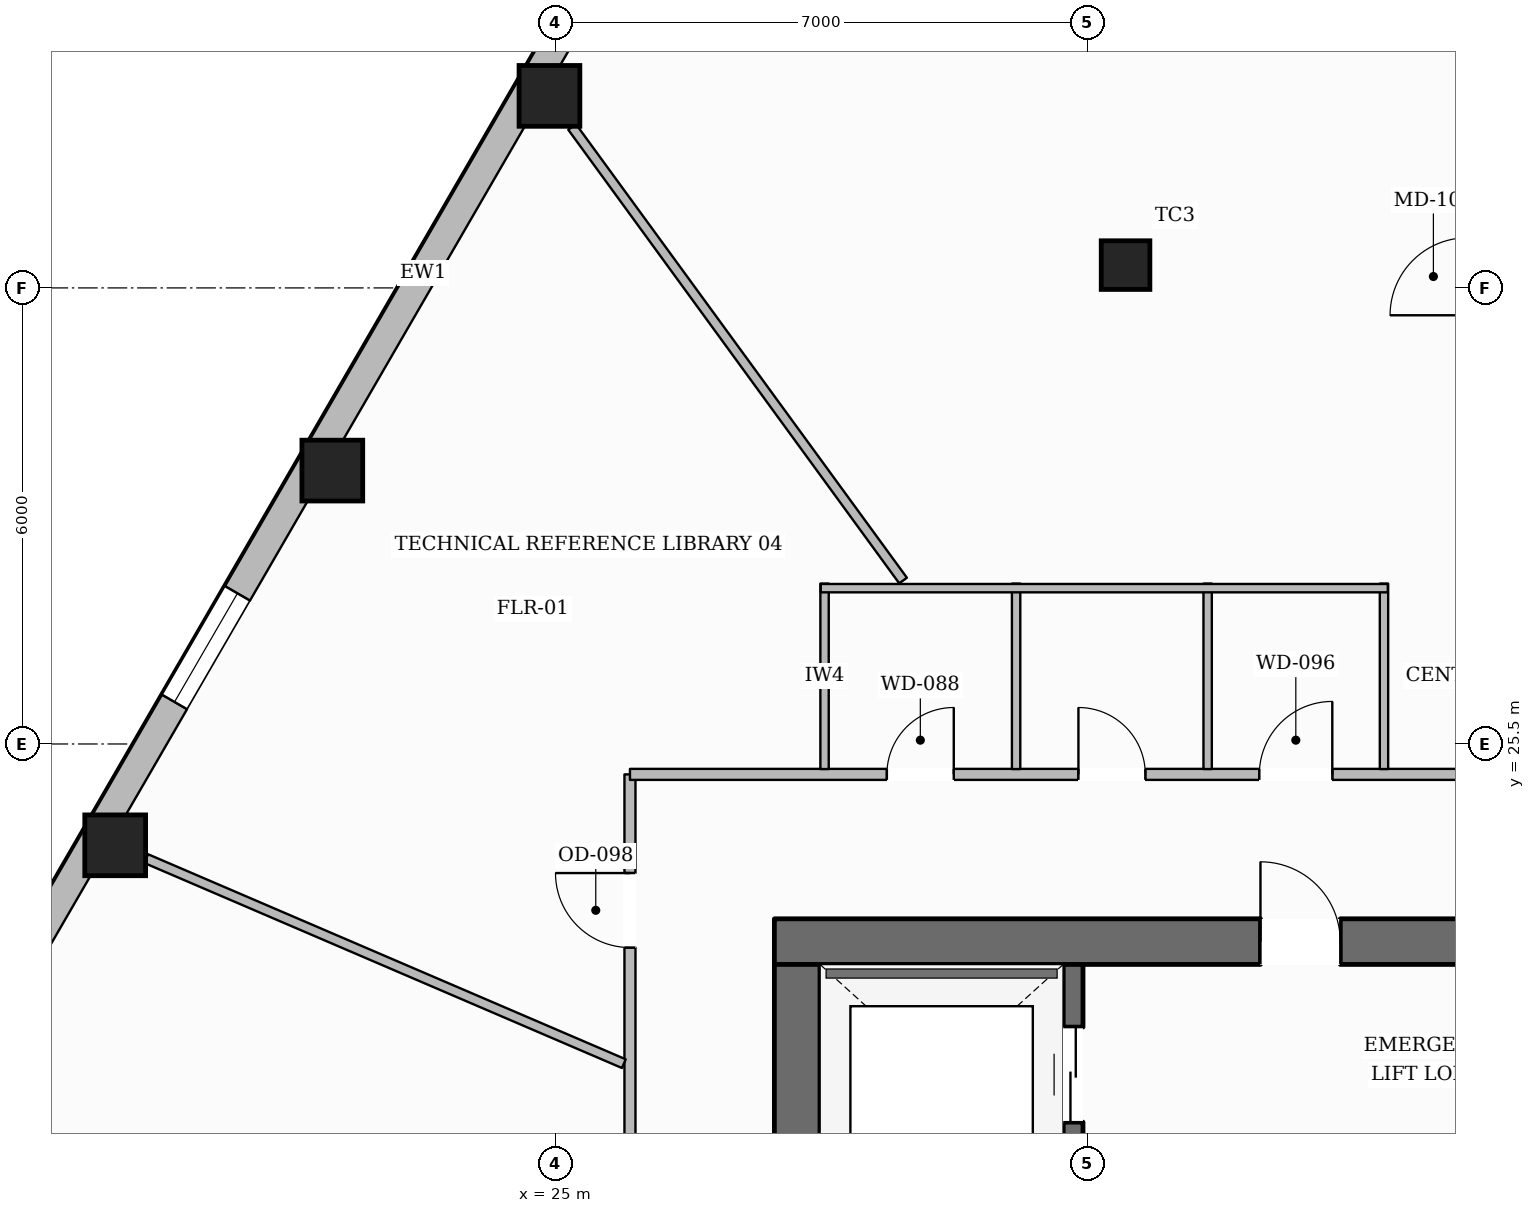
"""IFC4 building model, lengths in metres.
Left out: names, types, materials, properties, quantities, classifications, styles, units other than length and angle.
Written with IfcOpenShell. Run it as: python <this file> out.ifc"""

import sys

from ifc_helpers import new_model, si_unit, direction, frame, frame_2d, origin, origin_2d, place, context, subcontext, project, spatial, rectangle, hollow_rectangle, extrude, element, fill, save


model = new_model("IFC4")
c1 = context("Model", 3, precision=1e-05, world=origin(), true_north=direction((0.0, 1.0)))
c2 = subcontext(c1, "Body", "Model", "MODEL_VIEW")
j1 = project(units=[si_unit("LENGTHUNIT", "METRE"), si_unit("PLANEANGLEUNIT", "RADIAN")], contexts=[c1])
p1 = place(None, origin())
s1 = spatial("IfcSite", under=j1, at=p1, CompositionType="ELEMENT")
p2 = place(p1, origin())
s2 = spatial("IfcBuilding", under=s1, at=p2, CompositionType="ELEMENT")
p3 = place(p2, frame((0.0, 0.0, 52.2)))
s3 = spatial("IfcBuildingStorey", under=s2, at=p3, CompositionType="ELEMENT", Elevation=52.2)
p4 = place(p3, frame((27.88, 22.9, 0.0), z_axis=(0.0, 0.0, 1.0), x_axis=(1.0, 0.0, 0.0)))
e1 = element("IfcWall", 1, at=p4, inside=s3, PredefinedType="SOLIDWALL", context=c2, shape_type="SweptSolid", body=[
    extrude(rectangle(XDim=20.24, YDim=0.6, at=frame_2d((10.12, 0.0))), origin(), (0.0, 0.0, 1.0), 3.59),
])
p5 = place(p4, frame((6.395, 0.0, 0.0)))
e2 = element("IfcOpeningElement", 2, at=p5, cuts=e1, PredefinedType="OPENING", context=c2, shape_type="SweptSolid", body=[
    extrude(rectangle(XDim=1.05, YDim=2.15, at=frame_2d((0.525, 1.075))), frame((0.0, 0.31, 0.0), z_axis=(0.0, -1.0, 0.0), x_axis=(1.0, 0.0, 0.0)), (0.0, 0.0, 1.0), 0.62),
])
p6 = place(p4, frame((12.795, 0.0, 0.0)))
e3 = element("IfcOpeningElement", 3, at=p6, cuts=e1, PredefinedType="OPENING", context=c2, shape_type="SweptSolid", body=[
    extrude(rectangle(XDim=1.05, YDim=2.15, at=frame_2d((0.525, 1.075))), frame((0.0, 0.31, 0.0), z_axis=(0.0, -1.0, 0.0), x_axis=(1.0, 0.0, 0.0)), (0.0, 0.0, 1.0), 0.62),
])
p7 = place(p3, frame((28.18, 9.6, 0.0), z_axis=(0.0, 0.0, 1.0), x_axis=(0.0, 1.0, 0.0)))
e4 = element("IfcWall", 4, at=p7, inside=s3, PredefinedType="SOLIDWALL", context=c2, shape_type="SweptSolid", body=[
    extrude(rectangle(XDim=13.0, YDim=0.6, at=frame_2d((6.5, 0.0))), origin(), (0.0, 0.0, 1.0), 3.59),
])
p8 = place(p7, frame((0.2, 0.0, 0.0)))
e5 = element("IfcOpeningElement", 5, at=p8, cuts=e4, PredefinedType="OPENING", context=c2, shape_type="SweptSolid", body=[
    extrude(rectangle(XDim=1.1, YDim=2.15, at=frame_2d((0.55, 1.075))), frame((0.0, 0.31, 0.0), z_axis=(0.0, -1.0, 0.0), x_axis=(1.0, 0.0, 0.0)), (0.0, 0.0, 1.0), 0.62),
])
p9 = place(p7, frame((8.4, 0.0, 0.0)))
e6 = element("IfcOpeningElement", 6, at=p9, cuts=e4, PredefinedType="OPENING", context=c2, shape_type="SweptSolid", body=[
    extrude(rectangle(XDim=0.9, YDim=2.1, at=frame_2d((0.45, 1.05))), frame((0.0, 0.31, 0.0), z_axis=(0.0, -1.0, 0.0), x_axis=(1.0, 0.0, 0.0)), (0.0, 0.0, 1.0), 0.62),
])
p10 = place(p3, frame((31.81, 9.6, 0.0), z_axis=(0.0, 0.0, 1.0), x_axis=(0.0, 1.0, 0.0)))
e7 = element("IfcWall", 7, at=p10, inside=s3, PredefinedType="SHEAR", context=c2, shape_type="SweptSolid", body=[
    extrude(rectangle(XDim=13.0, YDim=0.26, at=frame_2d((6.5, 0.0))), origin(), (0.0, 0.0, 1.0), 3.59),
])
p11 = place(p10, frame((10.925, 0.0, 0.0)))
e8 = element("IfcOpeningElement", 8, at=p11, cuts=e7, PredefinedType="OPENING", context=c2, shape_type="SweptSolid", body=[
    extrude(rectangle(XDim=1.25, YDim=2.25, at=frame_2d((0.625, 1.125))), frame((0.0, 0.14, 0.0), z_axis=(0.0, -1.0, 0.0), x_axis=(1.0, 0.0, 0.0)), (0.0, 0.0, 1.0), 0.28),
])
for number, where, z_axis, x_axis in (
    (9, (24.921, 34.026, 0.0), (0.0, 0.0, 1.0), (1.0, 0.0, 0.0)),
    (10, (22.064, 29.097, 0.0), (0.0, 0.0, 1.0), (1.0, 0.0, 0.0)),
    (11, (19.208, 24.167, 0.0), (0.0, 0.0, 1.0), (1.0, 0.0, 0.0)),
):
    element("IfcColumn", number, at=place(p3, frame(where, z_axis=z_axis, x_axis=x_axis)), inside=s3, PredefinedType="COLUMN", context=c2, shape_type="SweptSolid", body=[
        extrude(hollow_rectangle(XDim=0.8, YDim=0.8, WallThickness=0.036, at=origin_2d()), origin(), (0.0, 0.0, 1.0), 3.59),
    ])
p12 = place(p3, frame((32.5, 31.8, 0.0), z_axis=(0.0, 0.0, 1.0), x_axis=(1.0, 0.0, 0.0)))
e12 = element("IfcColumn", 12, at=p12, inside=s3, PredefinedType="COLUMN", context=c2, shape_type="SweptSolid", body=[
    extrude(hollow_rectangle(XDim=0.64, YDim=0.64, WallThickness=0.028, at=origin_2d()), origin(), (0.0, 0.0, 1.0), 3.59),
])
p13 = place(p3, frame((13.02, 14.028, 0.0), z_axis=(0.0, 0.0, 1.0), x_axis=(0.501385664719, 0.86522391045, 0.0)))
e13 = element("IfcWall", 13, at=p13, inside=s3, PredefinedType="STANDARD", context=c2, shape_type="SweptSolid", body=[
    extrude(rectangle(XDim=35.142, YDim=0.38, at=frame_2d((17.571, 0.0))), origin(), (0.0, 0.0, 1.0), 2.97),
])
p14 = place(p13, frame((30.991, 0.0, 0.65)))
e14 = element("IfcOpeningElement", 14, at=p14, cuts=e13, PredefinedType="OPENING", context=c2, shape_type="SweptSolid", body=[
    extrude(rectangle(XDim=1.65, YDim=1.75, at=frame_2d((0.825, 0.875))), frame((0.0, 0.2, 0.0), z_axis=(0.0, -1.0, 0.0), x_axis=(1.0, 0.0, 0.0)), (0.0, 0.0, 1.0), 0.4),
])
p15 = place(p13, frame((25.293, 0.0, 0.65)))
e15 = element("IfcOpeningElement", 15, at=p15, cuts=e13, PredefinedType="OPENING", context=c2, shape_type="SweptSolid", body=[
    extrude(rectangle(XDim=1.65, YDim=1.75, at=frame_2d((0.825, 0.875))), frame((0.0, 0.2, 0.0), z_axis=(0.0, -1.0, 0.0), x_axis=(1.0, 0.0, 0.0)), (0.0, 0.0, 1.0), 0.4),
])
p16 = place(p13, frame((13.898, 0.0, 0.65)))
e16 = element("IfcOpeningElement", 16, at=p16, cuts=e13, PredefinedType="OPENING", context=c2, shape_type="SweptSolid", body=[
    extrude(rectangle(XDim=1.65, YDim=1.75, at=frame_2d((0.825, 0.875))), frame((0.0, 0.2, 0.0), z_axis=(0.0, -1.0, 0.0), x_axis=(1.0, 0.0, 0.0)), (0.0, 0.0, 1.0), 0.4),
])
p17 = place(p13, frame((8.201, 0.0, 0.65)))
e17 = element("IfcOpeningElement", 17, at=p17, cuts=e13, PredefinedType="OPENING", context=c2, shape_type="SweptSolid", body=[
    extrude(rectangle(XDim=1.65, YDim=1.75, at=frame_2d((0.825, 0.875))), frame((0.0, 0.2, 0.0), z_axis=(0.0, -1.0, 0.0), x_axis=(1.0, 0.0, 0.0)), (0.0, 0.0, 1.0), 0.4),
])
p18 = place(p13, frame((2.503, 0.0, 0.65)))
e18 = element("IfcOpeningElement", 18, at=p18, cuts=e13, PredefinedType="OPENING", context=c2, shape_type="SweptSolid", body=[
    extrude(rectangle(XDim=1.65, YDim=1.75, at=frame_2d((0.825, 0.875))), frame((0.0, 0.2, 0.0), z_axis=(0.0, -1.0, 0.0), x_axis=(1.0, 0.0, 0.0)), (0.0, 0.0, 1.0), 0.4),
])
p19 = place(p3, frame((25.98, 9.1, 0.0), z_axis=(0.0, 0.0, 1.0), x_axis=(0.0, 1.0, 0.0)))
e19 = element("IfcWall", 19, at=p19, inside=s3, PredefinedType="PARTITIONING", context=c2, shape_type="SweptSolid", body=[
    extrude(rectangle(XDim=16.0, YDim=0.145, at=frame_2d((8.0, 0.0))), origin(), (0.0, 0.0, 1.0), 3.278),
])
p20 = place(p19, frame((13.722, 0.0, 0.0)))
e20 = element("IfcOpeningElement", 20, at=p20, cuts=e19, PredefinedType="OPENING", context=c2, shape_type="SweptSolid", body=[
    extrude(rectangle(XDim=0.98, YDim=2.15, at=frame_2d((0.49, 1.075))), frame((0.0, 0.083, 0.0), z_axis=(0.0, -1.0, 0.0), x_axis=(1.0, 0.0, 0.0)), (0.0, 0.0, 1.0), 0.165),
])
p21 = place(p19, frame((7.387, 0.0, 0.0)))
e21 = element("IfcOpeningElement", 21, at=p21, cuts=e19, PredefinedType="OPENING", context=c2, shape_type="SweptSolid", body=[
    extrude(rectangle(XDim=1.4, YDim=2.2, at=frame_2d((0.7, 1.1))), frame((0.0, 0.083, 0.0), z_axis=(0.0, -1.0, 0.0), x_axis=(1.0, 0.0, 0.0)), (0.0, 0.0, 1.0), 0.165),
])
p22 = place(p3, frame((25.98, 25.1, 0.0), z_axis=(0.0, 0.0, 1.0), x_axis=(1.0, 0.0, 0.0)))
e22 = element("IfcWall", 22, at=p22, inside=s3, PredefinedType="PARTITIONING", context=c2, shape_type="SweptSolid", body=[
    extrude(rectangle(XDim=11.02, YDim=0.145, at=frame_2d((5.51, 0.0))), origin(), (0.0, 0.0, 1.0), 3.59),
])
p23 = place(p22, frame((3.38, 0.0, 0.0)))
e23 = element("IfcOpeningElement", 23, at=p23, cuts=e22, PredefinedType="OPENING", context=c2, shape_type="SweptSolid", body=[
    extrude(rectangle(XDim=0.88, YDim=2.1, at=frame_2d((0.44, 1.05))), frame((0.0, 0.083, 0.0), z_axis=(0.0, -1.0, 0.0), x_axis=(1.0, 0.0, 0.0)), (0.0, 0.0, 1.0), 0.165),
])
p24 = place(p22, frame((5.9, 0.0, 0.0)))
e24 = element("IfcOpeningElement", 24, at=p24, cuts=e22, PredefinedType="OPENING", context=c2, shape_type="SweptSolid", body=[
    extrude(rectangle(XDim=0.88, YDim=2.1, at=frame_2d((0.44, 1.05))), frame((0.0, 0.083, 0.0), z_axis=(0.0, -1.0, 0.0), x_axis=(1.0, 0.0, 0.0)), (0.0, 0.0, 1.0), 0.165),
])
p25 = place(p22, frame((8.28, 0.0, 0.0)))
e25 = element("IfcOpeningElement", 25, at=p25, cuts=e22, PredefinedType="OPENING", context=c2, shape_type="SweptSolid", body=[
    extrude(rectangle(XDim=0.96, YDim=2.1, at=frame_2d((0.48, 1.05))), frame((0.0, 0.083, 0.0), z_axis=(0.0, -1.0, 0.0), x_axis=(1.0, 0.0, 0.0)), (0.0, 0.0, 1.0), 0.165),
])
for number, where, z_axis, x_axis in (
    (26, (28.54, 25.17, 0.0), (0.0, 0.0, 1.0), (0.0, 1.0, 0.0)),
    (27, (31.06, 25.17, 0.0), (0.0, 0.0, 1.0), (0.0, 1.0, 0.0)),
    (28, (33.58, 25.17, 0.0), (0.0, 0.0, 1.0), (0.0, 1.0, 0.0)),
    (29, (35.9, 25.17, 0.0), (0.0, 0.0, 1.0), (0.0, 1.0, 0.0)),
):
    element("IfcWall", number, at=place(p3, frame(where, z_axis=z_axis, x_axis=x_axis)), inside=s3, PredefinedType="PLUMBINGWALL", context=c2, shape_type="SweptSolid", body=[
        extrude(rectangle(XDim=2.44, YDim=0.11, at=frame_2d((1.22, 0.0))), origin(), (0.0, 0.0, 1.0), 3.59),
    ])
p26 = place(p3, frame((28.49, 27.55, 0.0), z_axis=(0.0, 0.0, 1.0), x_axis=(1.0, 0.0, 0.0)))
e30 = element("IfcWall", 30, at=p26, inside=s3, PredefinedType="PLUMBINGWALL", context=c2, shape_type="SweptSolid", body=[
    extrude(rectangle(XDim=7.46, YDim=0.11, at=frame_2d((3.73, 0.0))), origin(), (0.0, 0.0, 1.0), 3.59),
])
p27 = place(p3, frame((29.573, 27.65, 0.0), z_axis=(0.0, 0.0, 1.0), x_axis=(-0.589404961233, 0.807837726077, 0.0)))
e31 = element("IfcWall", 31, at=p27, inside=s3, PredefinedType="PARTITIONING", context=c2, shape_type="SweptSolid", body=[
    extrude(rectangle(XDim=7.388, YDim=0.125, at=frame_2d((3.694, 0.0))), origin(), (0.0, 0.0, 1.0), 3.057),
])
p28 = place(p3, frame((25.899, 21.294, 0.0), z_axis=(0.0, 0.0, 1.0), x_axis=(-0.918912196595, 0.394462133734, 0.0)))
e32 = element("IfcWall", 32, at=p28, inside=s3, PredefinedType="PARTITIONING", context=c2, shape_type="SweptSolid", body=[
    extrude(rectangle(XDim=6.838, YDim=0.125, at=frame_2d((3.419, 0.0))), origin(), (0.0, 0.0, 1.0), 3.057),
])
p29 = place(p16, origin())
e33 = element("IfcWindow", 33, at=p29, inside=s3, PartitioningType="SINGLE_PANEL", PredefinedType="WINDOW", context=c2, shape_type="SweptSolid", body=[
    extrude(rectangle(XDim=1.65, YDim=1.75, at=frame_2d((0.825, 0.875))), frame((0.0, 0.03, 0.0), z_axis=(0.0, -1.0, 0.0), x_axis=(1.0, 0.0, 0.0)), (0.0, 0.0, 1.0), 0.06),
])
fill(e16, e33)
p30 = place(p5, origin())
e34 = element("IfcDoor", 34, at=p30, inside=s3, OperationType="SINGLE_SWING_LEFT", PredefinedType="DOOR", context=c2, shape_type="SweptSolid", body=[
    extrude(rectangle(XDim=1.05, YDim=2.15, at=frame_2d((0.525, 1.075))), frame((0.0, 0.025, 0.0), z_axis=(0.0, -1.0, 0.0), x_axis=(1.0, 0.0, 0.0)), (0.0, 0.0, 1.0), 0.05),
])
fill(e2, e34)
p31 = place(p11, origin())
e35 = element("IfcDoor", 35, at=p31, inside=s3, OperationType="DOUBLE_DOOR_SLIDING", PredefinedType="DOOR", context=c2, shape_type="SweptSolid", body=[
    extrude(rectangle(XDim=1.25, YDim=2.25, at=frame_2d((0.625, 1.125))), frame((0.0, 0.025, 0.0), z_axis=(0.0, -1.0, 0.0), x_axis=(1.0, 0.0, 0.0)), (0.0, 0.0, 1.0), 0.05),
])
fill(e8, e35)
p32 = place(p23, origin())
e36 = element("IfcDoor", 36, at=p32, inside=s3, OperationType="SINGLE_SWING_RIGHT", PredefinedType="DOOR", context=c2, shape_type="SweptSolid", body=[
    extrude(rectangle(XDim=0.88, YDim=2.1, at=frame_2d((0.44, 1.05))), frame((0.0, 0.025, 0.0), z_axis=(0.0, -1.0, 0.0), x_axis=(1.0, 0.0, 0.0)), (0.0, 0.0, 1.0), 0.05),
])
fill(e23, e36)
p33 = place(p24, origin())
e37 = element("IfcDoor", 37, at=p33, inside=s3, OperationType="SINGLE_SWING_LEFT", PredefinedType="DOOR", context=c2, shape_type="SweptSolid", body=[
    extrude(rectangle(XDim=0.88, YDim=2.1, at=frame_2d((0.44, 1.05))), frame((0.0, 0.025, 0.0), z_axis=(0.0, -1.0, 0.0), x_axis=(1.0, 0.0, 0.0)), (0.0, 0.0, 1.0), 0.05),
])
fill(e24, e37)
p34 = place(p25, origin())
e38 = element("IfcDoor", 38, at=p34, inside=s3, OperationType="SINGLE_SWING_RIGHT", PredefinedType="DOOR", context=c2, shape_type="SweptSolid", body=[
    extrude(rectangle(XDim=0.96, YDim=2.1, at=frame_2d((0.48, 1.05))), frame((0.0, 0.025, 0.0), z_axis=(0.0, -1.0, 0.0), x_axis=(1.0, 0.0, 0.0)), (0.0, 0.0, 1.0), 0.05),
])
fill(e25, e38)
p35 = place(p20, origin())
e39 = element("IfcDoor", 39, at=p35, inside=s3, OperationType="SINGLE_SWING_RIGHT", PredefinedType="DOOR", context=c2, shape_type="SweptSolid", body=[
    extrude(rectangle(XDim=0.98, YDim=2.15, at=frame_2d((0.49, 1.075))), frame((0.0, 0.025, 0.0), z_axis=(0.0, -1.0, 0.0), x_axis=(1.0, 0.0, 0.0)), (0.0, 0.0, 1.0), 0.05),
])
fill(e20, e39)
save(model, sys.argv[1])
